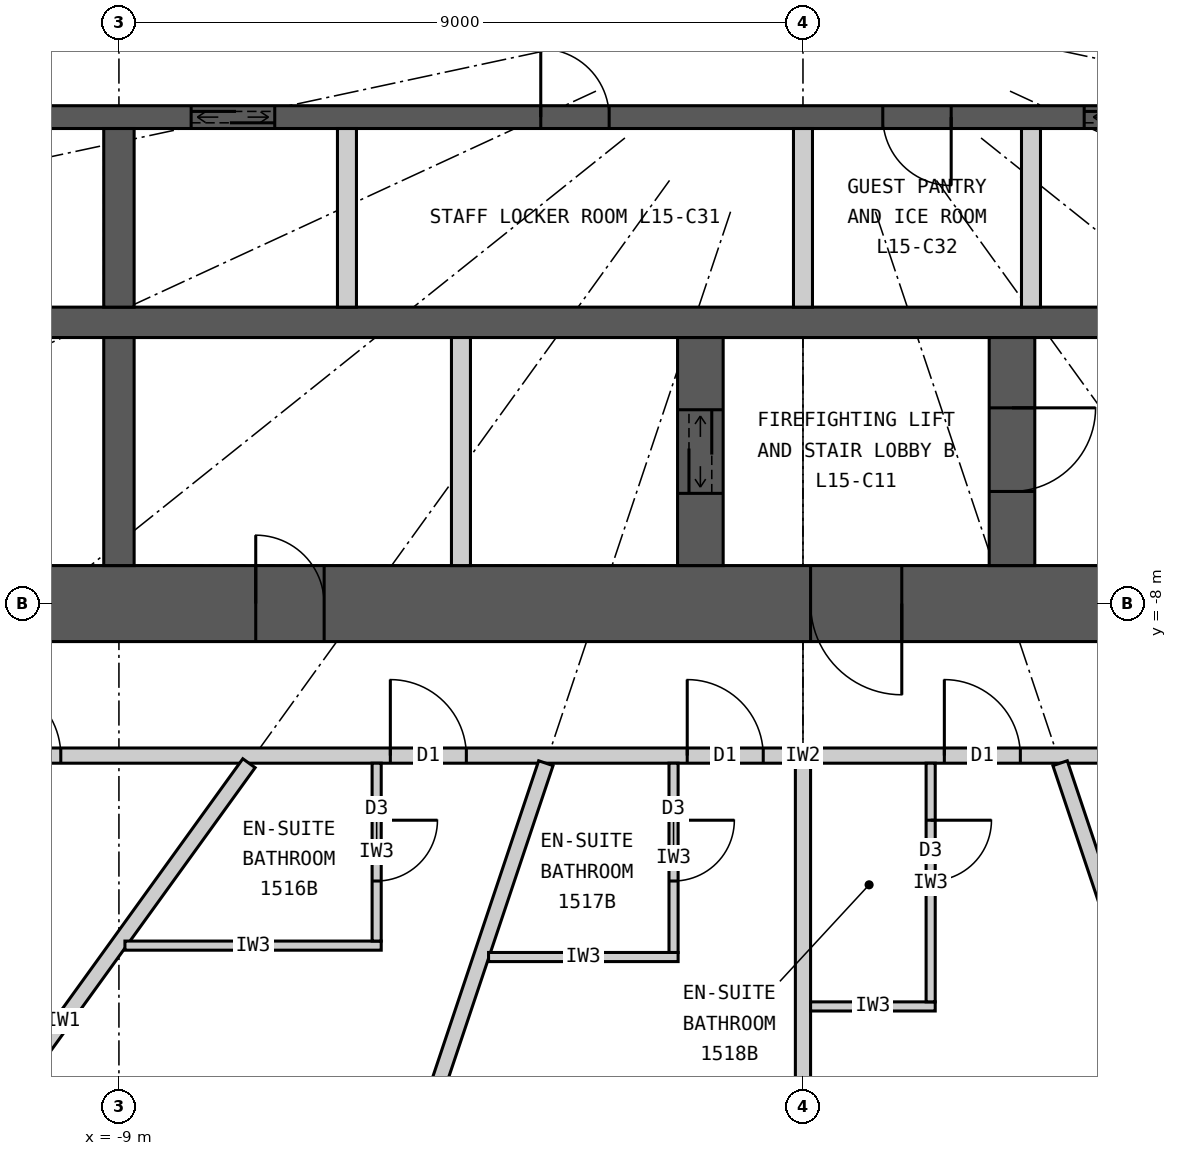
"""IFC4 building model, lengths in metres.
Left out: names, types, materials, properties, quantities, classifications, styles, units other than length and angle.
Written with IfcOpenShell. Run it as: python <this file> out.ifc"""

import sys

from ifc_helpers import new_model, si_unit, direction, frame, frame_2d, origin, place, context, subcontext, project, spatial, rectangle, extrude, element, fill, save


model = new_model("IFC4")
c1 = context("Model", 3, precision=1e-05, world=origin(), true_north=direction((0.0, 1.0)))
c2 = subcontext(c1, "Body", "Model", "MODEL_VIEW")
j1 = project(units=[si_unit("LENGTHUNIT", "METRE"), si_unit("PLANEANGLEUNIT", "RADIAN")], contexts=[c1])
p1 = place(None, origin())
s1 = spatial("IfcSite", under=j1, at=p1, CompositionType="ELEMENT")
p2 = place(p1, origin())
s2 = spatial("IfcBuilding", under=s1, at=p2, CompositionType="ELEMENT")
p3 = place(p2, frame((0.0, 0.0, 63.9)))
s3 = spatial("IfcBuildingStorey", under=s2, at=p3, CompositionType="ELEMENT", Elevation=63.9)
p4 = place(p3, frame((12.5, -8.0, 0.0), z_axis=(0.0, 0.0, 1.0), x_axis=(-1.0, 0.0, 0.0)))
e1 = element("IfcWall", 1, at=p4, inside=s3, PredefinedType="SHEAR", context=c2, shape_type="SweptSolid", body=[
    extrude(rectangle(XDim=25.0, YDim=1.0, at=frame_2d((12.5, 0.0))), origin(), (0.0, 0.0, 1.0), 3.3),
])
p5 = place(p4, frame((11.2, 0.0, 0.0)))
e2 = element("IfcOpeningElement", 2, at=p5, cuts=e1, PredefinedType="OPENING", context=c2, shape_type="SweptSolid", body=[
    extrude(rectangle(XDim=1.2, YDim=2.2, at=frame_2d((0.6, 1.1))), frame((0.0, 0.51, 0.0), z_axis=(0.0, -1.0, 0.0), x_axis=(1.0, 0.0, 0.0)), (0.0, 0.0, 1.0), 1.02),
])
p6 = place(p4, frame((18.8, 0.0, 0.0)))
e3 = element("IfcOpeningElement", 3, at=p6, cuts=e1, PredefinedType="OPENING", context=c2, shape_type="SweptSolid", body=[
    extrude(rectangle(XDim=0.9, YDim=2.2, at=frame_2d((0.45, 1.1))), frame((0.0, 0.51, 0.0), z_axis=(0.0, -1.0, 0.0), x_axis=(1.0, 0.0, 0.0)), (0.0, 0.0, 1.0), 1.02),
])
p7 = place(p3, frame((-11.5, -4.3, 0.0), z_axis=(0.0, 0.0, 1.0), x_axis=(1.0, 0.0, 0.0)))
e4 = element("IfcWall", 4, at=p7, inside=s3, PredefinedType="SHEAR", context=c2, shape_type="SweptSolid", body=[
    extrude(rectangle(XDim=23.0, YDim=0.4, at=frame_2d((11.5, 0.0))), origin(), (0.0, 0.0, 1.0), 3.3),
])
p8 = place(p3, frame((-11.5, -1.6, 0.0), z_axis=(0.0, 0.0, 1.0), x_axis=(1.0, 0.0, 0.0)))
e5 = element("IfcWall", 5, at=p8, inside=s3, PredefinedType="SHEAR", context=c2, shape_type="SweptSolid", body=[
    extrude(rectangle(XDim=23.0, YDim=0.3, at=frame_2d((11.5, 0.0))), origin(), (0.0, 0.0, 1.0), 3.3),
])
p9 = place(p8, frame((0.45, 0.0, 0.0)))
e6 = element("IfcOpeningElement", 6, at=p9, cuts=e5, PredefinedType="OPENING", context=c2, shape_type="SweptSolid", body=[
    extrude(rectangle(XDim=1.1, YDim=2.2, at=frame_2d((0.55, 1.1))), frame((0.0, 0.16, 0.0), z_axis=(0.0, -1.0, 0.0), x_axis=(1.0, 0.0, 0.0)), (0.0, 0.0, 1.0), 0.32),
])
p10 = place(p8, frame((3.45, 0.0, 0.0)))
e7 = element("IfcOpeningElement", 7, at=p10, cuts=e5, PredefinedType="OPENING", context=c2, shape_type="SweptSolid", body=[
    extrude(rectangle(XDim=1.1, YDim=2.2, at=frame_2d((0.55, 1.1))), frame((0.0, 0.16, 0.0), z_axis=(0.0, -1.0, 0.0), x_axis=(1.0, 0.0, 0.0)), (0.0, 0.0, 1.0), 0.32),
])
p11 = place(p8, frame((15.2, 0.0, 0.0)))
e8 = element("IfcOpeningElement", 8, at=p11, cuts=e5, PredefinedType="OPENING", context=c2, shape_type="SweptSolid", body=[
    extrude(rectangle(XDim=1.6, YDim=2.4, at=frame_2d((0.8, 1.2))), frame((0.0, 0.16, 0.0), z_axis=(0.0, -1.0, 0.0), x_axis=(1.0, 0.0, 0.0)), (0.0, 0.0, 1.0), 0.32),
])
p12 = place(p8, frame((8.05, 0.0, 0.0)))
e9 = element("IfcOpeningElement", 9, at=p12, cuts=e5, PredefinedType="OPENING", context=c2, shape_type="SweptSolid", body=[
    extrude(rectangle(XDim=0.9, YDim=2.2, at=frame_2d((0.45, 1.1))), frame((0.0, 0.16, 0.0), z_axis=(0.0, -1.0, 0.0), x_axis=(1.0, 0.0, 0.0)), (0.0, 0.0, 1.0), 0.32),
])
p13 = place(p8, frame((12.55, 0.0, 0.0)))
e10 = element("IfcOpeningElement", 10, at=p13, cuts=e5, PredefinedType="OPENING", context=c2, shape_type="SweptSolid", body=[
    extrude(rectangle(XDim=0.9, YDim=2.2, at=frame_2d((0.45, 1.1))), frame((0.0, 0.16, 0.0), z_axis=(0.0, -1.0, 0.0), x_axis=(1.0, 0.0, 0.0)), (0.0, 0.0, 1.0), 0.32),
])
p14 = place(p3, frame((-9.0, -4.1, 0.0), z_axis=(0.0, 0.0, 1.0), x_axis=(0.0, 1.0, 0.0)))
e11 = element("IfcWall", 11, at=p14, inside=s3, PredefinedType="SHEAR", context=c2, shape_type="SweptSolid", body=[
    extrude(rectangle(XDim=2.35, YDim=0.4, at=frame_2d((1.175, 0.0))), origin(), (0.0, 0.0, 1.0), 3.3),
])
p15 = place(p3, frame((-9.0, -7.5, 0.0), z_axis=(0.0, 0.0, 1.0), x_axis=(0.0, 1.0, 0.0)))
e12 = element("IfcWall", 12, at=p15, inside=s3, PredefinedType="SHEAR", context=c2, shape_type="SweptSolid", body=[
    extrude(rectangle(XDim=3.0, YDim=0.4, at=frame_2d((1.5, 0.0))), origin(), (0.0, 0.0, 1.0), 3.3),
])
p16 = place(p3, frame((2.75, -7.5, 0.0), z_axis=(0.0, 0.0, 1.0), x_axis=(0.0, 1.0, 0.0)))
e13 = element("IfcWall", 13, at=p16, inside=s3, PredefinedType="SHEAR", context=c2, shape_type="SweptSolid", body=[
    extrude(rectangle(XDim=3.0, YDim=0.6, at=frame_2d((1.5, 0.0))), origin(), (0.0, 0.0, 1.0), 3.3),
])
p17 = place(p16, frame((0.975, 0.0, 0.0)))
e14 = element("IfcOpeningElement", 14, at=p17, cuts=e13, PredefinedType="OPENING", context=c2, shape_type="SweptSolid", body=[
    extrude(rectangle(XDim=1.1, YDim=2.2, at=frame_2d((0.55, 1.1))), frame((0.0, 0.31, 0.0), z_axis=(0.0, -1.0, 0.0), x_axis=(1.0, 0.0, 0.0)), (0.0, 0.0, 1.0), 0.62),
])
p18 = place(p3, frame((-1.35, -7.5, 0.0), z_axis=(0.0, 0.0, 1.0), x_axis=(0.0, 1.0, 0.0)))
e15 = element("IfcWall", 15, at=p18, inside=s3, PredefinedType="SHEAR", context=c2, shape_type="SweptSolid", body=[
    extrude(rectangle(XDim=3.0, YDim=0.6, at=frame_2d((1.5, 0.0))), origin(), (0.0, 0.0, 1.0), 3.3),
])
p19 = place(p18, frame((0.95, 0.0, 0.0)))
e16 = element("IfcOpeningElement", 16, at=p19, cuts=e15, PredefinedType="OPENING", context=c2, shape_type="SweptSolid", body=[
    extrude(rectangle(XDim=1.1, YDim=2.2, at=frame_2d((0.55, 1.1))), frame((0.0, 0.31, 0.0), z_axis=(0.0, -1.0, 0.0), x_axis=(1.0, 0.0, 0.0)), (0.0, 0.0, 1.0), 0.62),
])
p20 = place(p3, frame((-4.5, -7.5, 0.0), z_axis=(0.0, 0.0, 1.0), x_axis=(0.0, 1.0, 0.0)))
e17 = element("IfcWall", 17, at=p20, inside=s3, PredefinedType="PARTITIONING", context=c2, shape_type="SweptSolid", body=[
    extrude(rectangle(XDim=3.0, YDim=0.25, at=frame_2d((1.5, 0.0))), origin(), (0.0, 0.0, 1.0), 3.3),
])
for number, where, z_axis, x_axis in (
    (18, (-6.0, -4.1, 0.0), (0.0, 0.0, 1.0), (0.0, 1.0, 0.0)),
    (19, (0.0, -4.1, 0.0), (0.0, 0.0, 1.0), (0.0, 1.0, 0.0)),
    (20, (3.0, -4.1, 0.0), (0.0, 0.0, 1.0), (0.0, 1.0, 0.0)),
):
    element("IfcWall", number, at=place(p3, frame(where, z_axis=z_axis, x_axis=x_axis)), inside=s3, PredefinedType="PARTITIONING", context=c2, shape_type="SweptSolid", body=[
        extrude(rectangle(XDim=2.35, YDim=0.25, at=frame_2d((1.175, 0.0))), origin(), (0.0, 0.0, 1.0), 3.3),
    ])
p21 = place(p3, frame((14.1, -10.0, 0.0), z_axis=(0.0, 0.0, 1.0), x_axis=(-1.0, 0.0, 0.0)))
e21 = element("IfcWall", 21, at=p21, inside=s3, PredefinedType="PARTITIONING", context=c2, shape_type="SweptSolid", body=[
    extrude(rectangle(XDim=28.2, YDim=0.2, at=frame_2d((14.1, 0.0))), origin(), (0.0, 0.0, 1.0), 3.12),
])
p22 = place(p21, frame((23.865, 0.0, 0.0)))
e22 = element("IfcOpeningElement", 22, at=p22, cuts=e21, PredefinedType="OPENING", context=c2, shape_type="SweptSolid", body=[
    extrude(rectangle(XDim=1.0, YDim=2.2, at=frame_2d((0.5, 1.1))), frame((0.0, 0.11, 0.0), z_axis=(0.0, -1.0, 0.0), x_axis=(1.0, 0.0, 0.0)), (0.0, 0.0, 1.0), 0.22),
])
p23 = place(p21, frame((18.529, 0.0, 0.0)))
e23 = element("IfcOpeningElement", 23, at=p23, cuts=e21, PredefinedType="OPENING", context=c2, shape_type="SweptSolid", body=[
    extrude(rectangle(XDim=1.0, YDim=2.2, at=frame_2d((0.5, 1.1))), frame((0.0, 0.11, 0.0), z_axis=(0.0, -1.0, 0.0), x_axis=(1.0, 0.0, 0.0)), (0.0, 0.0, 1.0), 0.22),
])
p24 = place(p21, frame((14.623, 0.0, 0.0)))
e24 = element("IfcOpeningElement", 24, at=p24, cuts=e21, PredefinedType="OPENING", context=c2, shape_type="SweptSolid", body=[
    extrude(rectangle(XDim=1.0, YDim=2.2, at=frame_2d((0.5, 1.1))), frame((0.0, 0.11, 0.0), z_axis=(0.0, -1.0, 0.0), x_axis=(1.0, 0.0, 0.0)), (0.0, 0.0, 1.0), 0.22),
])
p25 = place(p21, frame((11.24, 0.0, 0.0)))
e25 = element("IfcOpeningElement", 25, at=p25, cuts=e21, PredefinedType="OPENING", context=c2, shape_type="SweptSolid", body=[
    extrude(rectangle(XDim=1.0, YDim=2.2, at=frame_2d((0.5, 1.1))), frame((0.0, 0.11, 0.0), z_axis=(0.0, -1.0, 0.0), x_axis=(1.0, 0.0, 0.0)), (0.0, 0.0, 1.0), 0.22),
])
p26 = place(p21, frame((8.671, 0.0, 0.0)))
e26 = element("IfcOpeningElement", 26, at=p26, cuts=e21, PredefinedType="OPENING", context=c2, shape_type="SweptSolid", body=[
    extrude(rectangle(XDim=1.0, YDim=2.2, at=frame_2d((0.5, 1.1))), frame((0.0, 0.11, 0.0), z_axis=(0.0, -1.0, 0.0), x_axis=(1.0, 0.0, 0.0)), (0.0, 0.0, 1.0), 0.22),
])
p27 = place(p21, frame((2.801, 0.0, 0.0)))
e27 = element("IfcOpeningElement", 27, at=p27, cuts=e21, PredefinedType="OPENING", context=c2, shape_type="SweptSolid", body=[
    extrude(rectangle(XDim=1.0, YDim=2.2, at=frame_2d((0.5, 1.1))), frame((0.0, 0.11, 0.0), z_axis=(0.0, -1.0, 0.0), x_axis=(1.0, 0.0, 0.0)), (0.0, 0.0, 1.0), 0.22),
])
p28 = place(p3, frame((-7.289, -10.1, 0.0), z_axis=(0.0, 0.0, 1.0), x_axis=(-0.585198353053, -0.810890182197, 0.0)))
e28 = element("IfcWall", 28, at=p28, inside=s3, PredefinedType="PARTITIONING", context=c2, shape_type="SweptSolid", body=[
    extrude(rectangle(XDim=8.36, YDim=0.2, at=frame_2d((4.18, 0.0))), origin(), (0.0, 0.0, 1.0), 2.32),
])
p29 = place(p3, frame((-3.383, -10.1, 0.0), z_axis=(0.0, 0.0, 1.0), x_axis=(-0.31759592231, -0.948226149256, 0.0)))
e29 = element("IfcWall", 29, at=p29, inside=s3, PredefinedType="PARTITIONING", context=c2, shape_type="SweptSolid", body=[
    extrude(rectangle(XDim=9.098, YDim=0.2, at=frame_2d((4.549, 0.0))), origin(), (0.0, 0.0, 1.0), 2.32),
])
p30 = place(p3, frame((0.0, -10.1, 0.0), z_axis=(0.0, 0.0, 1.0), x_axis=(0.0, -1.0, 0.0)))
e30 = element("IfcWall", 30, at=p30, inside=s3, PredefinedType="PARTITIONING", context=c2, shape_type="SweptSolid", body=[
    extrude(rectangle(XDim=9.25, YDim=0.2, at=frame_2d((4.625, 0.0))), origin(), (0.0, 0.0, 1.0), 2.32),
])
p31 = place(p3, frame((3.383, -10.1, 0.0), z_axis=(0.0, 0.0, 1.0), x_axis=(0.31759592231, -0.948226149256, 0.0)))
e31 = element("IfcWall", 31, at=p31, inside=s3, PredefinedType="PARTITIONING", context=c2, shape_type="SweptSolid", body=[
    extrude(rectangle(XDim=9.098, YDim=0.2, at=frame_2d((4.549, 0.0))), origin(), (0.0, 0.0, 1.0), 2.32),
])
p32 = place(p3, frame((-8.921, -12.5, 0.0), z_axis=(0.0, 0.0, 1.0), x_axis=(1.0, 0.0, 0.0)))
e32 = element("IfcWall", 32, at=p32, inside=s3, PredefinedType="PARTITIONING", context=c2, shape_type="SweptSolid", body=[
    extrude(rectangle(XDim=3.372, YDim=0.12, at=frame_2d((1.686, 0.0))), origin(), (0.0, 0.0, 1.0), 3.12),
])
p33 = place(p3, frame((-5.609, -10.1, 0.0), z_axis=(0.0, 0.0, 1.0), x_axis=(0.0, -1.0, 0.0)))
e33 = element("IfcWall", 33, at=p33, inside=s3, PredefinedType="PARTITIONING", context=c2, shape_type="SweptSolid", body=[
    extrude(rectangle(XDim=2.34, YDim=0.12, at=frame_2d((1.17, 0.0))), origin(), (0.0, 0.0, 1.0), 3.12),
])
p34 = place(p33, frame((0.75, 0.0, 0.0)))
e34 = element("IfcOpeningElement", 34, at=p34, cuts=e33, PredefinedType="OPENING", context=c2, shape_type="SweptSolid", body=[
    extrude(rectangle(XDim=0.8, YDim=2.1, at=frame_2d((0.4, 1.05))), frame((0.0, 0.07, 0.0), z_axis=(0.0, -1.0, 0.0), x_axis=(1.0, 0.0, 0.0)), (0.0, 0.0, 1.0), 0.14),
])
p35 = place(p3, frame((-4.137, -12.65, 0.0), z_axis=(0.0, 0.0, 1.0), x_axis=(1.0, 0.0, 0.0)))
e35 = element("IfcWall", 35, at=p35, inside=s3, PredefinedType="PARTITIONING", context=c2, shape_type="SweptSolid", body=[
    extrude(rectangle(XDim=2.494, YDim=0.12, at=frame_2d((1.247, 0.0))), origin(), (0.0, 0.0, 1.0), 3.12),
])
p36 = place(p3, frame((-1.703, -10.1, 0.0), z_axis=(0.0, 0.0, 1.0), x_axis=(0.0, -1.0, 0.0)))
e36 = element("IfcWall", 36, at=p36, inside=s3, PredefinedType="PARTITIONING", context=c2, shape_type="SweptSolid", body=[
    extrude(rectangle(XDim=2.49, YDim=0.12, at=frame_2d((1.245, 0.0))), origin(), (0.0, 0.0, 1.0), 3.12),
])
p37 = place(p36, frame((0.75, 0.0, 0.0)))
e37 = element("IfcOpeningElement", 37, at=p37, cuts=e36, PredefinedType="OPENING", context=c2, shape_type="SweptSolid", body=[
    extrude(rectangle(XDim=0.8, YDim=2.1, at=frame_2d((0.4, 1.05))), frame((0.0, 0.07, 0.0), z_axis=(0.0, -1.0, 0.0), x_axis=(1.0, 0.0, 0.0)), (0.0, 0.0, 1.0), 0.14),
])
p38 = place(p3, frame((0.1, -13.3, 0.0), z_axis=(0.0, 0.0, 1.0), x_axis=(1.0, 0.0, 0.0)))
e38 = element("IfcWall", 38, at=p38, inside=s3, PredefinedType="PARTITIONING", context=c2, shape_type="SweptSolid", body=[
    extrude(rectangle(XDim=1.64, YDim=0.12, at=frame_2d((0.82, 0.0))), origin(), (0.0, 0.0, 1.0), 3.12),
])
p39 = place(p3, frame((1.68, -10.1, 0.0), z_axis=(0.0, 0.0, 1.0), x_axis=(0.0, -1.0, 0.0)))
e39 = element("IfcWall", 39, at=p39, inside=s3, PredefinedType="PARTITIONING", context=c2, shape_type="SweptSolid", body=[
    extrude(rectangle(XDim=3.14, YDim=0.12, at=frame_2d((1.57, 0.0))), origin(), (0.0, 0.0, 1.0), 3.12),
])
p40 = place(p39, frame((0.75, 0.0, 0.0)))
e40 = element("IfcOpeningElement", 40, at=p40, cuts=e39, PredefinedType="OPENING", context=c2, shape_type="SweptSolid", body=[
    extrude(rectangle(XDim=0.8, YDim=2.1, at=frame_2d((0.4, 1.05))), frame((0.0, 0.07, 0.0), z_axis=(0.0, -1.0, 0.0), x_axis=(1.0, 0.0, 0.0)), (0.0, 0.0, 1.0), 0.14),
])
p41 = place(p22, origin())
e41 = element("IfcDoor", 41, at=p41, inside=s3, OperationType="SINGLE_SWING_RIGHT", PredefinedType="DOOR", context=c2, shape_type="SweptSolid", body=[
    extrude(rectangle(XDim=1.0, YDim=2.2, at=frame_2d((0.5, 1.1))), frame((0.0, 0.025, 0.0), z_axis=(0.0, -1.0, 0.0), x_axis=(1.0, 0.0, 0.0)), (0.0, 0.0, 1.0), 0.05),
])
fill(e22, e41)
p42 = place(p34, origin())
e42 = element("IfcDoor", 42, at=p42, inside=s3, OperationType="SINGLE_SWING_LEFT", PredefinedType="DOOR", context=c2, shape_type="SweptSolid", body=[
    extrude(rectangle(XDim=0.8, YDim=2.1, at=frame_2d((0.4, 1.05))), frame((0.0, 0.025, 0.0), z_axis=(0.0, -1.0, 0.0), x_axis=(1.0, 0.0, 0.0)), (0.0, 0.0, 1.0), 0.05),
])
fill(e34, e42)
p43 = place(p23, origin())
e43 = element("IfcDoor", 43, at=p43, inside=s3, OperationType="SINGLE_SWING_RIGHT", PredefinedType="DOOR", context=c2, shape_type="SweptSolid", body=[
    extrude(rectangle(XDim=1.0, YDim=2.2, at=frame_2d((0.5, 1.1))), frame((0.0, 0.025, 0.0), z_axis=(0.0, -1.0, 0.0), x_axis=(1.0, 0.0, 0.0)), (0.0, 0.0, 1.0), 0.05),
])
fill(e23, e43)
p44 = place(p37, origin())
e44 = element("IfcDoor", 44, at=p44, inside=s3, OperationType="SINGLE_SWING_LEFT", PredefinedType="DOOR", context=c2, shape_type="SweptSolid", body=[
    extrude(rectangle(XDim=0.8, YDim=2.1, at=frame_2d((0.4, 1.05))), frame((0.0, 0.025, 0.0), z_axis=(0.0, -1.0, 0.0), x_axis=(1.0, 0.0, 0.0)), (0.0, 0.0, 1.0), 0.05),
])
fill(e37, e44)
p45 = place(p24, origin())
e45 = element("IfcDoor", 45, at=p45, inside=s3, OperationType="SINGLE_SWING_RIGHT", PredefinedType="DOOR", context=c2, shape_type="SweptSolid", body=[
    extrude(rectangle(XDim=1.0, YDim=2.2, at=frame_2d((0.5, 1.1))), frame((0.0, 0.025, 0.0), z_axis=(0.0, -1.0, 0.0), x_axis=(1.0, 0.0, 0.0)), (0.0, 0.0, 1.0), 0.05),
])
fill(e24, e45)
p46 = place(p40, origin())
e46 = element("IfcDoor", 46, at=p46, inside=s3, OperationType="SINGLE_SWING_LEFT", PredefinedType="DOOR", context=c2, shape_type="SweptSolid", body=[
    extrude(rectangle(XDim=0.8, YDim=2.1, at=frame_2d((0.4, 1.05))), frame((0.0, 0.025, 0.0), z_axis=(0.0, -1.0, 0.0), x_axis=(1.0, 0.0, 0.0)), (0.0, 0.0, 1.0), 0.05),
])
fill(e40, e46)
p47 = place(p25, origin())
e47 = element("IfcDoor", 47, at=p47, inside=s3, OperationType="SINGLE_SWING_RIGHT", PredefinedType="DOOR", context=c2, shape_type="SweptSolid", body=[
    extrude(rectangle(XDim=1.0, YDim=2.2, at=frame_2d((0.5, 1.1))), frame((0.0, 0.025, 0.0), z_axis=(0.0, -1.0, 0.0), x_axis=(1.0, 0.0, 0.0)), (0.0, 0.0, 1.0), 0.05),
])
fill(e25, e47)
p48 = place(p5, origin())
e48 = element("IfcDoor", 48, at=p48, inside=s3, OperationType="SINGLE_SWING_LEFT", PredefinedType="DOOR", context=c2, shape_type="SweptSolid", body=[
    extrude(rectangle(XDim=1.2, YDim=2.2, at=frame_2d((0.6, 1.1))), frame((0.0, 0.025, 0.0), z_axis=(0.0, -1.0, 0.0), x_axis=(1.0, 0.0, 0.0)), (0.0, 0.0, 1.0), 0.05),
])
fill(e2, e48)
p49 = place(p17, origin())
e49 = element("IfcDoor", 49, at=p49, inside=s3, OperationType="SINGLE_SWING_RIGHT", PredefinedType="DOOR", context=c2, shape_type="SweptSolid", body=[
    extrude(rectangle(XDim=1.1, YDim=2.2, at=frame_2d((0.55, 1.1))), frame((0.0, 0.025, 0.0), z_axis=(0.0, -1.0, 0.0), x_axis=(1.0, 0.0, 0.0)), (0.0, 0.0, 1.0), 0.05),
])
fill(e14, e49)
p50 = place(p19, origin())
e50 = element("IfcDoor", 50, at=p50, inside=s3, OperationType="DOUBLE_DOOR_SLIDING", PredefinedType="DOOR", context=c2, shape_type="SweptSolid", body=[
    extrude(rectangle(XDim=1.1, YDim=2.2, at=frame_2d((0.55, 1.1))), frame((0.0, 0.025, 0.0), z_axis=(0.0, -1.0, 0.0), x_axis=(1.0, 0.0, 0.0)), (0.0, 0.0, 1.0), 0.05),
])
fill(e16, e50)
p51 = place(p6, origin())
e51 = element("IfcDoor", 51, at=p51, inside=s3, OperationType="SINGLE_SWING_RIGHT", PredefinedType="DOOR", context=c2, shape_type="SweptSolid", body=[
    extrude(rectangle(XDim=0.9, YDim=2.2, at=frame_2d((0.45, 1.1))), frame((0.0, 0.025, 0.0), z_axis=(0.0, -1.0, 0.0), x_axis=(1.0, 0.0, 0.0)), (0.0, 0.0, 1.0), 0.05),
])
fill(e3, e51)
p52 = place(p10, origin())
e52 = element("IfcDoor", 52, at=p52, inside=s3, OperationType="DOUBLE_DOOR_SLIDING", PredefinedType="DOOR", context=c2, shape_type="SweptSolid", body=[
    extrude(rectangle(XDim=1.1, YDim=2.2, at=frame_2d((0.55, 1.1))), frame((0.0, 0.025, 0.0), z_axis=(0.0, -1.0, 0.0), x_axis=(1.0, 0.0, 0.0)), (0.0, 0.0, 1.0), 0.05),
])
fill(e7, e52)
p53 = place(p11, origin())
e53 = element("IfcDoor", 53, at=p53, inside=s3, OperationType="DOUBLE_DOOR_SLIDING", PredefinedType="DOOR", context=c2, shape_type="SweptSolid", body=[
    extrude(rectangle(XDim=1.6, YDim=2.4, at=frame_2d((0.8, 1.2))), frame((0.0, 0.025, 0.0), z_axis=(0.0, -1.0, 0.0), x_axis=(1.0, 0.0, 0.0)), (0.0, 0.0, 1.0), 0.05),
])
fill(e8, e53)
p54 = place(p12, origin())
e54 = element("IfcDoor", 54, at=p54, inside=s3, OperationType="SINGLE_SWING_LEFT", PredefinedType="DOOR", context=c2, shape_type="SweptSolid", body=[
    extrude(rectangle(XDim=0.9, YDim=2.2, at=frame_2d((0.45, 1.1))), frame((0.0, 0.025, 0.0), z_axis=(0.0, -1.0, 0.0), x_axis=(1.0, 0.0, 0.0)), (0.0, 0.0, 1.0), 0.05),
])
fill(e9, e54)
p55 = place(p13, origin())
e55 = element("IfcDoor", 55, at=p55, inside=s3, OperationType="SINGLE_SWING_RIGHT", PredefinedType="DOOR", context=c2, shape_type="SweptSolid", body=[
    extrude(rectangle(XDim=0.9, YDim=2.2, at=frame_2d((0.45, 1.1))), frame((0.0, 0.025, 0.0), z_axis=(0.0, -1.0, 0.0), x_axis=(1.0, 0.0, 0.0)), (0.0, 0.0, 1.0), 0.05),
])
fill(e10, e55)
save(model, sys.argv[1])
